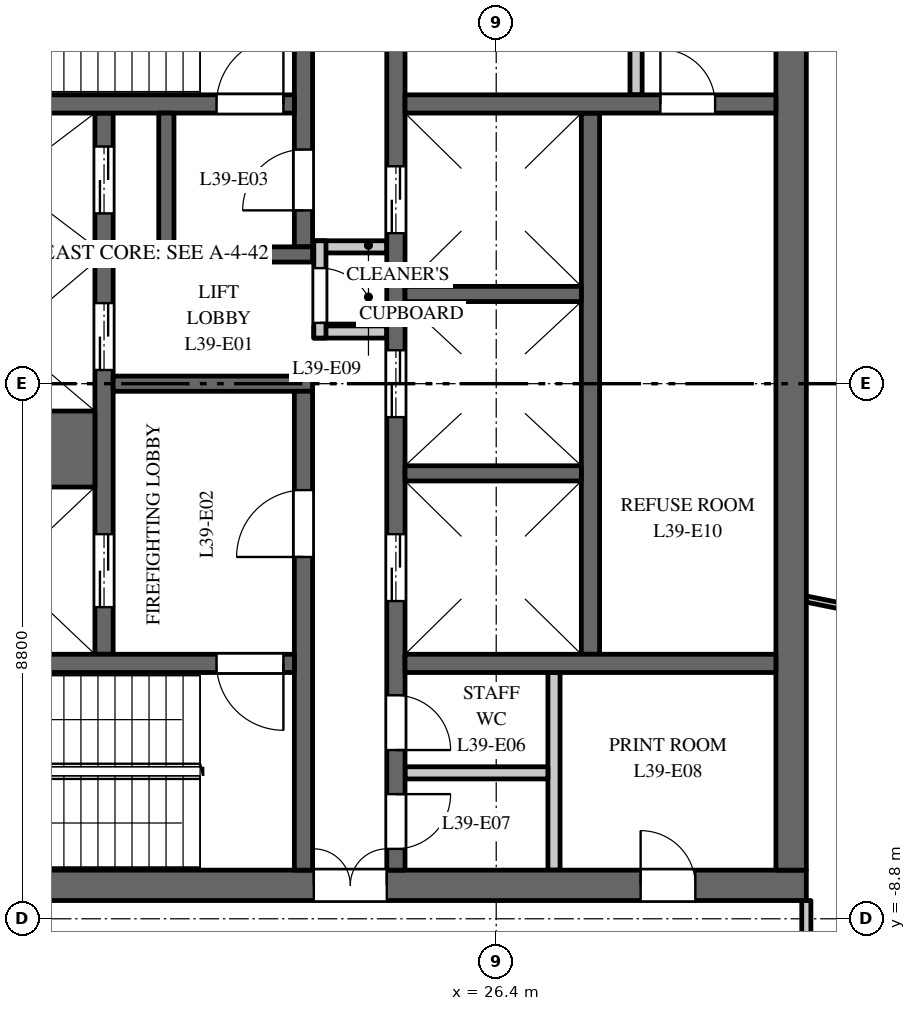
"""IFC4 building model, lengths in metres.
Left out: names, types, materials, properties, quantities, classifications, styles, units other than length and angle.
Written with IfcOpenShell. Run it as: python <this file> out.ifc"""

import sys

from ifc_helpers import new_model, si_unit, direction, frame, frame_2d, origin, place, context, subcontext, project, spatial, rectangle, extrude, element, fill, save


model = new_model("IFC4")
c1 = context("Model", 3, precision=1e-05, world=origin(), true_north=direction((0.0, 1.0)))
c2 = subcontext(c1, "Body", "Model", "MODEL_VIEW")
j1 = project(units=[si_unit("LENGTHUNIT", "METRE"), si_unit("PLANEANGLEUNIT", "RADIAN")], contexts=[c1])
p1 = place(None, origin())
s1 = spatial("IfcSite", under=j1, at=p1, CompositionType="ELEMENT")
p2 = place(p1, origin())
s2 = spatial("IfcBuilding", under=s1, at=p2, CompositionType="ELEMENT")
p3 = place(p2, frame((0.0, 0.0, 170.0)))
s3 = spatial("IfcBuildingStorey", under=s2, at=p3, CompositionType="ELEMENT", Elevation=170.0)
p4 = place(p3, frame((16.5, -8.25, 0.0), z_axis=(0.0, 0.0, 1.0), x_axis=(1.0, 0.0, 0.0)))
e1 = element("IfcWall", 1, at=p4, inside=s3, PredefinedType="SHEAR", context=c2, shape_type="SweptSolid", body=[
    extrude(rectangle(XDim=15.0, YDim=0.5, at=frame_2d((7.5, 0.0))), origin(), (0.0, 0.0, 1.0), 3.7),
])
p5 = place(p4, frame((6.9, 0.0, 0.0)))
e2 = element("IfcOpeningElement", 2, at=p5, cuts=e1, PredefinedType="OPENING", context=c2, shape_type="SweptSolid", body=[
    extrude(rectangle(XDim=1.2, YDim=2.1, at=frame_2d((0.6, 1.05))), frame((0.0, 0.26, 0.0), z_axis=(0.0, -1.0, 0.0), x_axis=(1.0, 0.0, 0.0)), (0.0, 0.0, 1.0), 0.52),
])
p6 = place(p4, frame((12.275, 0.0, 0.0)))
e3 = element("IfcOpeningElement", 3, at=p6, cuts=e1, PredefinedType="OPENING", context=c2, shape_type="SweptSolid", body=[
    extrude(rectangle(XDim=0.9, YDim=2.1, at=frame_2d((0.45, 1.05))), frame((0.0, 0.26, 0.0), z_axis=(0.0, -1.0, 0.0), x_axis=(1.0, 0.0, 0.0)), (0.0, 0.0, 1.0), 0.52),
])
p7 = place(p3, frame((27.95, -4.45, 0.0), z_axis=(0.0, 0.0, 1.0), x_axis=(0.0, 1.0, 0.0)))
e4 = element("IfcWall", 4, at=p7, inside=s3, PredefinedType="SHEAR", context=c2, shape_type="SweptSolid", body=[
    extrude(rectangle(XDim=8.9, YDim=0.3, at=frame_2d((4.45, 0.0))), origin(), (0.0, 0.0, 1.0), 3.7),
])
p8 = place(p3, frame((19.95, -4.45, 0.0), z_axis=(0.0, 0.0, 1.0), x_axis=(0.0, 1.0, 0.0)))
e5 = element("IfcWall", 5, at=p8, inside=s3, PredefinedType="SHEAR", context=c2, shape_type="SweptSolid", body=[
    extrude(rectangle(XDim=8.9, YDim=0.3, at=frame_2d((4.45, 0.0))), origin(), (0.0, 0.0, 1.0), 3.7),
])
p9 = place(p8, frame((0.775, 0.0, 0.0)))
e6 = element("IfcOpeningElement", 6, at=p9, cuts=e5, PredefinedType="OPENING", context=c2, shape_type="SweptSolid", body=[
    extrude(rectangle(XDim=1.2, YDim=2.1, at=frame_2d((0.6, 1.05))), frame((0.0, 0.16, 0.0), z_axis=(0.0, -1.0, 0.0), x_axis=(1.0, 0.0, 0.0)), (0.0, 0.0, 1.0), 0.32),
])
p10 = place(p8, frame((4.675, 0.0, 0.0)))
e7 = element("IfcOpeningElement", 7, at=p10, cuts=e5, PredefinedType="OPENING", context=c2, shape_type="SweptSolid", body=[
    extrude(rectangle(XDim=1.1, YDim=2.1, at=frame_2d((0.55, 1.05))), frame((0.0, 0.16, 0.0), z_axis=(0.0, -1.0, 0.0), x_axis=(1.0, 0.0, 0.0)), (0.0, 0.0, 1.0), 0.32),
])
p11 = place(p8, frame((7.25, 0.0, 0.0)))
e8 = element("IfcOpeningElement", 8, at=p11, cuts=e5, PredefinedType="OPENING", context=c2, shape_type="SweptSolid", body=[
    extrude(rectangle(XDim=1.1, YDim=2.1, at=frame_2d((0.55, 1.05))), frame((0.0, 0.16, 0.0), z_axis=(0.0, -1.0, 0.0), x_axis=(1.0, 0.0, 0.0)), (0.0, 0.0, 1.0), 0.32),
])
p12 = place(p3, frame((24.75, -8.0, 0.0), z_axis=(0.0, 0.0, 1.0), x_axis=(0.0, 1.0, 0.0)))
e9 = element("IfcWall", 9, at=p12, inside=s3, PredefinedType="SHEAR", context=c2, shape_type="SweptSolid", body=[
    extrude(rectangle(XDim=16.0, YDim=0.3, at=frame_2d((8.0, 0.0))), origin(), (0.0, 0.0, 1.0), 3.7),
])
p13 = place(p12, frame((4.425, 0.0, 0.0)))
e10 = element("IfcOpeningElement", 10, at=p13, cuts=e9, PredefinedType="OPENING", context=c2, shape_type="SweptSolid", body=[
    extrude(rectangle(XDim=1.1, YDim=2.1, at=frame_2d((0.55, 1.05))), frame((0.0, 0.16, 0.0), z_axis=(0.0, -1.0, 0.0), x_axis=(1.0, 0.0, 0.0)), (0.0, 0.0, 1.0), 0.32),
])
p14 = place(p12, frame((7.45, 0.0, 0.0)))
e11 = element("IfcOpeningElement", 11, at=p14, cuts=e9, PredefinedType="OPENING", context=c2, shape_type="SweptSolid", body=[
    extrude(rectangle(XDim=1.1, YDim=2.1, at=frame_2d((0.55, 1.05))), frame((0.0, 0.16, 0.0), z_axis=(0.0, -1.0, 0.0), x_axis=(1.0, 0.0, 0.0)), (0.0, 0.0, 1.0), 0.32),
])
p15 = place(p12, frame((10.475, 0.0, 0.0)))
e12 = element("IfcOpeningElement", 12, at=p15, cuts=e9, PredefinedType="OPENING", context=c2, shape_type="SweptSolid", body=[
    extrude(rectangle(XDim=1.1, YDim=2.1, at=frame_2d((0.55, 1.05))), frame((0.0, 0.16, 0.0), z_axis=(0.0, -1.0, 0.0), x_axis=(1.0, 0.0, 0.0)), (0.0, 0.0, 1.0), 0.32),
])
p16 = place(p12, frame((13.75, 0.0, 0.0)))
e13 = element("IfcOpeningElement", 13, at=p16, cuts=e9, PredefinedType="OPENING", context=c2, shape_type="SweptSolid", body=[
    extrude(rectangle(XDim=0.9, YDim=2.1, at=frame_2d((0.45, 1.05))), frame((0.0, 0.16, 0.0), z_axis=(0.0, -1.0, 0.0), x_axis=(1.0, 0.0, 0.0)), (0.0, 0.0, 1.0), 0.32),
])
p17 = place(p12, frame((1.975, 0.0, 0.0)))
e14 = element("IfcOpeningElement", 14, at=p17, cuts=e9, PredefinedType="OPENING", context=c2, shape_type="SweptSolid", body=[
    extrude(rectangle(XDim=0.9, YDim=2.1, at=frame_2d((0.45, 1.05))), frame((0.0, 0.16, 0.0), z_axis=(0.0, -1.0, 0.0), x_axis=(1.0, 0.0, 0.0)), (0.0, 0.0, 1.0), 0.32),
])
p18 = place(p12, frame((0.35, 0.0, 0.0)))
e15 = element("IfcOpeningElement", 15, at=p18, cuts=e9, PredefinedType="OPENING", context=c2, shape_type="SweptSolid", body=[
    extrude(rectangle(XDim=0.9, YDim=2.1, at=frame_2d((0.45, 1.05))), frame((0.0, 0.16, 0.0), z_axis=(0.0, -1.0, 0.0), x_axis=(1.0, 0.0, 0.0)), (0.0, 0.0, 1.0), 0.32),
])
p19 = place(p3, frame((20.1, 0.0, 0.0), z_axis=(0.0, 0.0, 1.0), x_axis=(1.0, 0.0, 0.0)))
e16 = element("IfcWall", 16, at=p19, inside=s3, PredefinedType="SHEAR", context=c2, shape_type="SweptSolid", body=[
    extrude(rectangle(XDim=3.28, YDim=0.25, at=frame_2d((1.64, 0.0))), origin(), (0.0, 0.0, 1.0), 3.7),
])
for number, where, z_axis, x_axis in (
    (17, (23.4, 0.85, 0.0), (0.0, 0.0, 1.0), (1.0, 0.0, 0.0)),
    (18, (23.4, 2.25, 0.0), (0.0, 0.0, 1.0), (1.0, 0.0, 0.0)),
):
    element("IfcWall", number, at=place(p3, frame(where, z_axis=z_axis, x_axis=x_axis)), inside=s3, PredefinedType="PARTITIONING", context=c2, shape_type="SweptSolid", body=[
        extrude(rectangle(XDim=1.2, YDim=0.2, at=frame_2d((0.6, 0.0))), origin(), (0.0, 0.0, 1.0), 3.7),
    ])
p20 = place(p3, frame((23.5, 0.75, 0.0), z_axis=(0.0, 0.0, 1.0), x_axis=(0.0, 1.0, 0.0)))
e19 = element("IfcWall", 19, at=p20, inside=s3, PredefinedType="PARTITIONING", context=c2, shape_type="SweptSolid", body=[
    extrude(rectangle(XDim=1.6, YDim=0.2, at=frame_2d((0.8, 0.0))), origin(), (0.0, 0.0, 1.0), 3.7),
])
p21 = place(p20, frame((0.25, 0.0, 0.0)))
e20 = element("IfcOpeningElement", 20, at=p21, cuts=e19, PredefinedType="OPENING", context=c2, shape_type="SweptSolid", body=[
    extrude(rectangle(XDim=0.9, YDim=2.1, at=frame_2d((0.45, 1.05))), frame((0.0, 0.11, 0.0), z_axis=(0.0, -1.0, 0.0), x_axis=(1.0, 0.0, 0.0)), (0.0, 0.0, 1.0), 0.22),
])
p22 = place(p3, frame((31.25, -8.0, 0.0), z_axis=(0.0, 0.0, 1.0), x_axis=(0.0, 1.0, 0.0)))
e21 = element("IfcWall", 21, at=p22, inside=s3, PredefinedType="SHEAR", context=c2, shape_type="SweptSolid", body=[
    extrude(rectangle(XDim=16.0, YDim=0.5, at=frame_2d((8.0, 0.0))), origin(), (0.0, 0.0, 1.0), 3.7),
])
p23 = place(p3, frame((24.9, 4.6, 0.0), z_axis=(0.0, 0.0, 1.0), x_axis=(1.0, 0.0, 0.0)))
e22 = element("IfcWall", 22, at=p23, inside=s3, PredefinedType="SHEAR", context=c2, shape_type="SweptSolid", body=[
    extrude(rectangle(XDim=6.1, YDim=0.3, at=frame_2d((3.05, 0.0))), origin(), (0.0, 0.0, 1.0), 3.7),
])
p24 = place(p23, frame((4.2, 0.0, 0.0)))
e23 = element("IfcOpeningElement", 23, at=p24, cuts=e22, PredefinedType="OPENING", context=c2, shape_type="SweptSolid", body=[
    extrude(rectangle(XDim=0.9, YDim=2.1, at=frame_2d((0.45, 1.05))), frame((0.0, 0.16, 0.0), z_axis=(0.0, -1.0, 0.0), x_axis=(1.0, 0.0, 0.0)), (0.0, 0.0, 1.0), 0.32),
])
for number, where, z_axis, x_axis in (
    (24, (28.7, 4.75, 0.0), (0.0, 0.0, 1.0), (0.0, 1.0, 0.0)),
    (25, (27.35, -8.0, 0.0), (0.0, 0.0, 1.0), (0.0, 1.0, 0.0)),
):
    element("IfcWall", number, at=place(p3, frame(where, z_axis=z_axis, x_axis=x_axis)), inside=s3, PredefinedType="PARTITIONING", context=c2, shape_type="SweptSolid", body=[
        extrude(rectangle(XDim=3.25, YDim=0.2, at=frame_2d((1.625, 0.0))), origin(), (0.0, 0.0, 1.0), 3.7),
    ])
p25 = place(p3, frame((24.9, -6.4, 0.0), z_axis=(0.0, 0.0, 1.0), x_axis=(1.0, 0.0, 0.0)))
e26 = element("IfcWall", 26, at=p25, inside=s3, PredefinedType="PARTITIONING", context=c2, shape_type="SweptSolid", body=[
    extrude(rectangle(XDim=2.35, YDim=0.2, at=frame_2d((1.175, 0.0))), origin(), (0.0, 0.0, 1.0), 3.7),
])
p26 = place(p3, frame((24.9, -4.6, 0.0), z_axis=(0.0, 0.0, 1.0), x_axis=(1.0, 0.0, 0.0)))
e27 = element("IfcWall", 27, at=p26, inside=s3, PredefinedType="SHEAR", context=c2, shape_type="SweptSolid", body=[
    extrude(rectangle(XDim=6.1, YDim=0.3, at=frame_2d((3.05, 0.0))), origin(), (0.0, 0.0, 1.0), 3.7),
])
p27 = place(p3, frame((16.9, -1.075, 0.0), z_axis=(0.0, 0.0, 1.0), x_axis=(1.0, 0.0, 0.0)))
e28 = element("IfcWall", 28, at=p27, inside=s3, PredefinedType="SHEAR", context=c2, shape_type="SweptSolid", body=[
    extrude(rectangle(XDim=2.9, YDim=1.25, at=frame_2d((1.45, 0.0))), origin(), (0.0, 0.0, 1.0), 3.7),
])
for number, where, z_axis, x_axis in (
    (29, (16.9, 2.125, 0.0), (0.0, 0.0, 1.0), (1.0, 0.0, 0.0)),
    (30, (24.9, -1.475, 0.0), (0.0, 0.0, 1.0), (1.0, 0.0, 0.0)),
    (31, (24.9, 1.475, 0.0), (0.0, 0.0, 1.0), (1.0, 0.0, 0.0)),
):
    element("IfcWall", number, at=place(p3, frame(where, z_axis=z_axis, x_axis=x_axis)), inside=s3, PredefinedType="SHEAR", context=c2, shape_type="SweptSolid", body=[
        extrude(rectangle(XDim=2.9, YDim=0.25, at=frame_2d((1.45, 0.0))), origin(), (0.0, 0.0, 1.0), 3.7),
    ])
p28 = place(p3, frame((23.23, 2.25, 0.0), z_axis=(0.0, 0.0, 1.0), x_axis=(0.0, 1.0, 0.0)))
e32 = element("IfcWall", 32, at=p28, inside=s3, PredefinedType="SHEAR", context=c2, shape_type="SweptSolid", body=[
    extrude(rectangle(XDim=5.75, YDim=0.3, at=frame_2d((2.875, 0.0))), origin(), (0.0, 0.0, 1.0), 3.7),
])
p29 = place(p28, frame((0.6, 0.0, 0.0)))
e33 = element("IfcOpeningElement", 33, at=p29, cuts=e32, PredefinedType="OPENING", context=c2, shape_type="SweptSolid", body=[
    extrude(rectangle(XDim=1.0, YDim=2.1, at=frame_2d((0.5, 1.05))), frame((0.0, 0.16, 0.0), z_axis=(0.0, -1.0, 0.0), x_axis=(1.0, 0.0, 0.0)), (0.0, 0.0, 1.0), 0.32),
])
p30 = place(p3, frame((23.23, -8.0, 0.0), z_axis=(0.0, 0.0, 1.0), x_axis=(0.0, 1.0, 0.0)))
e34 = element("IfcWall", 34, at=p30, inside=s3, PredefinedType="SHEAR", context=c2, shape_type="SweptSolid", body=[
    extrude(rectangle(XDim=7.875, YDim=0.3, at=frame_2d((3.938, 0.0))), origin(), (0.0, 0.0, 1.0), 3.7),
])
p31 = place(p30, frame((5.15, 0.0, 0.0)))
e35 = element("IfcOpeningElement", 35, at=p31, cuts=e34, PredefinedType="OPENING", context=c2, shape_type="SweptSolid", body=[
    extrude(rectangle(XDim=1.1, YDim=2.1, at=frame_2d((0.55, 1.05))), frame((0.0, 0.16, 0.0), z_axis=(0.0, -1.0, 0.0), x_axis=(1.0, 0.0, 0.0)), (0.0, 0.0, 1.0), 0.32),
])
p32 = place(p3, frame((16.9, 4.6, 0.0), z_axis=(0.0, 0.0, 1.0), x_axis=(1.0, 0.0, 0.0)))
e36 = element("IfcWall", 36, at=p32, inside=s3, PredefinedType="SHEAR", context=c2, shape_type="SweptSolid", body=[
    extrude(rectangle(XDim=6.18, YDim=0.3, at=frame_2d((3.09, 0.0))), origin(), (0.0, 0.0, 1.0), 3.7),
])
p33 = place(p32, frame((4.9, 0.0, 0.0)))
e37 = element("IfcOpeningElement", 37, at=p33, cuts=e36, PredefinedType="OPENING", context=c2, shape_type="SweptSolid", body=[
    extrude(rectangle(XDim=1.1, YDim=2.1, at=frame_2d((0.55, 1.05))), frame((0.0, 0.16, 0.0), z_axis=(0.0, -1.0, 0.0), x_axis=(1.0, 0.0, 0.0)), (0.0, 0.0, 1.0), 0.32),
])
p34 = place(p3, frame((16.9, -4.6, 0.0), z_axis=(0.0, 0.0, 1.0), x_axis=(1.0, 0.0, 0.0)))
e38 = element("IfcWall", 38, at=p34, inside=s3, PredefinedType="SHEAR", context=c2, shape_type="SweptSolid", body=[
    extrude(rectangle(XDim=6.18, YDim=0.3, at=frame_2d((3.09, 0.0))), origin(), (0.0, 0.0, 1.0), 3.7),
])
p35 = place(p34, frame((4.9, 0.0, 0.0)))
e39 = element("IfcOpeningElement", 39, at=p35, cuts=e38, PredefinedType="OPENING", context=c2, shape_type="SweptSolid", body=[
    extrude(rectangle(XDim=1.1, YDim=2.1, at=frame_2d((0.55, 1.05))), frame((0.0, 0.16, 0.0), z_axis=(0.0, -1.0, 0.0), x_axis=(1.0, 0.0, 0.0)), (0.0, 0.0, 1.0), 0.32),
])
p36 = place(p3, frame((20.85, 2.125, 0.0), z_axis=(0.0, 0.0, 1.0), x_axis=(1.0, 0.0, 0.0)))
e40 = element("IfcWall", 40, at=p36, inside=s3, PredefinedType="SHEAR", context=c2, shape_type="SweptSolid", body=[
    extrude(rectangle(XDim=2.53, YDim=0.25, at=frame_2d((1.265, 0.0))), origin(), (0.0, 0.0, 1.0), 3.7),
])
p37 = place(p3, frame((20.975, 2.25, 0.0), z_axis=(0.0, 0.0, 1.0), x_axis=(0.0, 1.0, 0.0)))
e41 = element("IfcWall", 41, at=p37, inside=s3, PredefinedType="SHEAR", context=c2, shape_type="SweptSolid", body=[
    extrude(rectangle(XDim=2.2, YDim=0.25, at=frame_2d((1.1, 0.0))), origin(), (0.0, 0.0, 1.0), 3.7),
])
p38 = place(p3, frame((31.5, -10.7, 0.0), z_axis=(0.0, 0.0, 1.0), x_axis=(0.0, 1.0, 0.0)))
e42 = element("IfcWall", 42, at=p38, inside=s3, PredefinedType="PARTITIONING", context=c2, shape_type="SweptSolid", body=[
    extrude(rectangle(XDim=2.2, YDim=0.15, at=frame_2d((1.1, 0.0))), origin(), (0.0, 0.0, 1.0), 2.9),
])
p39 = place(p3, frame((31.5, -3.542, 0.0), z_axis=(0.0, 0.0, 1.0), x_axis=(0.980357474535, -0.197228857227, 0.0)))
e43 = element("IfcWall", 43, at=p39, inside=s3, PredefinedType="PARTITIONING", context=c2, shape_type="SweptSolid", body=[
    extrude(rectangle(XDim=4.092, YDim=0.1, at=frame_2d((2.046, 0.0))), origin(), (0.0, 0.0, 1.0), 2.9),
])
p40 = place(p9, origin())
e44 = element("IfcDoor", 44, at=p40, inside=s3, OperationType="DOUBLE_DOOR_SLIDING", PredefinedType="DOOR", context=c2, shape_type="SweptSolid", body=[
    extrude(rectangle(XDim=1.2, YDim=2.1, at=frame_2d((0.6, 1.05))), frame((0.0, 0.025, 0.0), z_axis=(0.0, -1.0, 0.0), x_axis=(1.0, 0.0, 0.0)), (0.0, 0.0, 1.0), 0.05),
])
fill(e6, e44)
p41 = place(p10, origin())
e45 = element("IfcDoor", 45, at=p41, inside=s3, OperationType="DOUBLE_DOOR_SLIDING", PredefinedType="DOOR", context=c2, shape_type="SweptSolid", body=[
    extrude(rectangle(XDim=1.1, YDim=2.1, at=frame_2d((0.55, 1.05))), frame((0.0, 0.025, 0.0), z_axis=(0.0, -1.0, 0.0), x_axis=(1.0, 0.0, 0.0)), (0.0, 0.0, 1.0), 0.05),
])
fill(e7, e45)
p42 = place(p11, origin())
e46 = element("IfcDoor", 46, at=p42, inside=s3, OperationType="DOUBLE_DOOR_SLIDING", PredefinedType="DOOR", context=c2, shape_type="SweptSolid", body=[
    extrude(rectangle(XDim=1.1, YDim=2.1, at=frame_2d((0.55, 1.05))), frame((0.0, 0.025, 0.0), z_axis=(0.0, -1.0, 0.0), x_axis=(1.0, 0.0, 0.0)), (0.0, 0.0, 1.0), 0.05),
])
fill(e8, e46)
p43 = place(p13, origin())
e47 = element("IfcDoor", 47, at=p43, inside=s3, OperationType="DOUBLE_DOOR_SLIDING", PredefinedType="DOOR", context=c2, shape_type="SweptSolid", body=[
    extrude(rectangle(XDim=1.1, YDim=2.1, at=frame_2d((0.55, 1.05))), frame((0.0, 0.025, 0.0), z_axis=(0.0, -1.0, 0.0), x_axis=(1.0, 0.0, 0.0)), (0.0, 0.0, 1.0), 0.05),
])
fill(e10, e47)
p44 = place(p14, origin())
e48 = element("IfcDoor", 48, at=p44, inside=s3, OperationType="DOUBLE_DOOR_SLIDING", PredefinedType="DOOR", context=c2, shape_type="SweptSolid", body=[
    extrude(rectangle(XDim=1.1, YDim=2.1, at=frame_2d((0.55, 1.05))), frame((0.0, 0.025, 0.0), z_axis=(0.0, -1.0, 0.0), x_axis=(1.0, 0.0, 0.0)), (0.0, 0.0, 1.0), 0.05),
])
fill(e11, e48)
p45 = place(p15, origin())
e49 = element("IfcDoor", 49, at=p45, inside=s3, OperationType="DOUBLE_DOOR_SLIDING", PredefinedType="DOOR", context=c2, shape_type="SweptSolid", body=[
    extrude(rectangle(XDim=1.1, YDim=2.1, at=frame_2d((0.55, 1.05))), frame((0.0, 0.025, 0.0), z_axis=(0.0, -1.0, 0.0), x_axis=(1.0, 0.0, 0.0)), (0.0, 0.0, 1.0), 0.05),
])
fill(e12, e49)
p46 = place(p33, origin())
e50 = element("IfcDoor", 50, at=p46, inside=s3, OperationType="SINGLE_SWING_LEFT", PredefinedType="DOOR", context=c2, shape_type="SweptSolid", body=[
    extrude(rectangle(XDim=1.1, YDim=2.1, at=frame_2d((0.55, 1.05))), frame((0.0, 0.025, 0.0), z_axis=(0.0, -1.0, 0.0), x_axis=(1.0, 0.0, 0.0)), (0.0, 0.0, 1.0), 0.05),
])
fill(e37, e50)
p47 = place(p35, origin())
e51 = element("IfcDoor", 51, at=p47, inside=s3, OperationType="SINGLE_SWING_RIGHT", PredefinedType="DOOR", context=c2, shape_type="SweptSolid", body=[
    extrude(rectangle(XDim=1.1, YDim=2.1, at=frame_2d((0.55, 1.05))), frame((0.0, 0.025, 0.0), z_axis=(0.0, -1.0, 0.0), x_axis=(1.0, 0.0, 0.0)), (0.0, 0.0, 1.0), 0.05),
])
fill(e39, e51)
p48 = place(p31, origin())
e52 = element("IfcDoor", 52, at=p48, inside=s3, OperationType="SINGLE_SWING_RIGHT", PredefinedType="DOOR", context=c2, shape_type="SweptSolid", body=[
    extrude(rectangle(XDim=1.1, YDim=2.1, at=frame_2d((0.55, 1.05))), frame((0.0, 0.025, 0.0), z_axis=(0.0, -1.0, 0.0), x_axis=(1.0, 0.0, 0.0)), (0.0, 0.0, 1.0), 0.05),
])
fill(e35, e52)
p49 = place(p29, origin())
e53 = element("IfcDoor", 53, at=p49, inside=s3, OperationType="SINGLE_SWING_RIGHT", PredefinedType="DOOR", context=c2, shape_type="SweptSolid", body=[
    extrude(rectangle(XDim=1.0, YDim=2.1, at=frame_2d((0.5, 1.05))), frame((0.0, 0.025, 0.0), z_axis=(0.0, -1.0, 0.0), x_axis=(1.0, 0.0, 0.0)), (0.0, 0.0, 1.0), 0.05),
])
fill(e33, e53)
p50 = place(p5, origin())
e54 = element("IfcDoor", 54, at=p50, inside=s3, OperationType="DOUBLE_DOOR_DOUBLE_SWING", PredefinedType="DOOR", context=c2, shape_type="SweptSolid", body=[
    extrude(rectangle(XDim=1.2, YDim=2.1, at=frame_2d((0.6, 1.05))), frame((0.0, 0.025, 0.0), z_axis=(0.0, -1.0, 0.0), x_axis=(1.0, 0.0, 0.0)), (0.0, 0.0, 1.0), 0.05),
])
fill(e2, e54)
p51 = place(p17, origin())
e55 = element("IfcDoor", 55, at=p51, inside=s3, OperationType="SINGLE_SWING_LEFT", PredefinedType="DOOR", context=c2, shape_type="SweptSolid", body=[
    extrude(rectangle(XDim=0.9, YDim=2.1, at=frame_2d((0.45, 1.05))), frame((0.0, 0.025, 0.0), z_axis=(0.0, -1.0, 0.0), x_axis=(1.0, 0.0, 0.0)), (0.0, 0.0, 1.0), 0.05),
])
fill(e14, e55)
p52 = place(p18, origin())
e56 = element("IfcDoor", 56, at=p52, inside=s3, OperationType="SINGLE_SWING_RIGHT", PredefinedType="DOOR", context=c2, shape_type="SweptSolid", body=[
    extrude(rectangle(XDim=0.9, YDim=2.1, at=frame_2d((0.45, 1.05))), frame((0.0, 0.025, 0.0), z_axis=(0.0, -1.0, 0.0), x_axis=(1.0, 0.0, 0.0)), (0.0, 0.0, 1.0), 0.05),
])
fill(e15, e56)
p53 = place(p6, origin())
e57 = element("IfcDoor", 57, at=p53, inside=s3, OperationType="SINGLE_SWING_RIGHT", PredefinedType="DOOR", context=c2, shape_type="SweptSolid", body=[
    extrude(rectangle(XDim=0.9, YDim=2.1, at=frame_2d((0.45, 1.05))), frame((0.0, 0.025, 0.0), z_axis=(0.0, -1.0, 0.0), x_axis=(1.0, 0.0, 0.0)), (0.0, 0.0, 1.0), 0.05),
])
fill(e3, e57)
p54 = place(p21, origin())
e58 = element("IfcDoor", 58, at=p54, inside=s3, OperationType="SINGLE_SWING_LEFT", PredefinedType="DOOR", context=c2, shape_type="SweptSolid", body=[
    extrude(rectangle(XDim=0.9, YDim=2.1, at=frame_2d((0.45, 1.05))), frame((0.0, 0.025, 0.0), z_axis=(0.0, -1.0, 0.0), x_axis=(1.0, 0.0, 0.0)), (0.0, 0.0, 1.0), 0.05),
])
fill(e20, e58)
p55 = place(p24, origin())
e59 = element("IfcDoor", 59, at=p55, inside=s3, OperationType="SINGLE_SWING_RIGHT", PredefinedType="DOOR", context=c2, shape_type="SweptSolid", body=[
    extrude(rectangle(XDim=0.9, YDim=2.1, at=frame_2d((0.45, 1.05))), frame((0.0, 0.025, 0.0), z_axis=(0.0, -1.0, 0.0), x_axis=(1.0, 0.0, 0.0)), (0.0, 0.0, 1.0), 0.05),
])
fill(e23, e59)
save(model, sys.argv[1])
